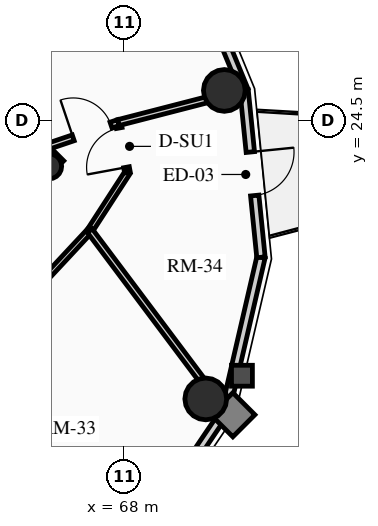
"""IFC4 building model, lengths in metres.
Left out: names, types, materials, properties, quantities, classifications, styles, units other than length and angle.
Written with IfcOpenShell. Run it as: python <this file> out.ifc"""

import sys

from ifc_helpers import new_model, si_unit, direction, frame, frame_2d, origin, origin_2d, place, context, subcontext, project, spatial, rectangle, circle, hollow_circle, extrude, source, transform, mapped, element, fill, save


model = new_model("IFC4")
c1 = context("Model", 3, precision=1e-05, world=origin(), true_north=direction((0.0, 1.0)))
c2 = subcontext(c1, "Body", "Model", "MODEL_VIEW")
j1 = project(units=[si_unit("LENGTHUNIT", "METRE"), si_unit("PLANEANGLEUNIT", "RADIAN")], contexts=[c1])
p1 = place(None, origin())
s1 = spatial("IfcSite", under=j1, at=p1, CompositionType="ELEMENT")
p2 = place(p1, origin())
s2 = spatial("IfcBuilding", under=s1, at=p2, CompositionType="ELEMENT")
p3 = place(p2, frame((0.0, 0.0, 214.12)))
s3 = spatial("IfcBuildingStorey", under=s2, at=p3, CompositionType="ELEMENT", Elevation=214.12)
p4 = place(p3, frame((66.268, 23.298, 0.0), z_axis=(0.0, 0.0, 1.0), x_axis=(-0.707106781187, 0.707106781187, 0.0)))
e1 = element("IfcWall", 1, at=p4, inside=s3, PredefinedType="SHEAR", context=c2, shape_type="SweptSolid", body=[
    extrude(rectangle(XDim=14.1, YDim=0.4, at=frame_2d((7.05, 0.0))), origin(), (0.0, 0.0, 1.0), 2.91),
])
p5 = place(p3, frame((58.561, 15.873, 0.0), z_axis=(0.0, 0.0, 1.0), x_axis=(0.707106781187, 0.707106781187, 0.0)))
e2 = element("IfcWall", 2, at=p5, inside=s3, PredefinedType="SHEAR", context=c2, shape_type="SweptSolid", body=[
    extrude(rectangle(XDim=10.7, YDim=0.4, at=frame_2d((5.35, 0.0))), origin(), (0.0, 0.0, 1.0), 2.91),
])
m1 = source(origin(), c2, "Body", "SweptSolid", [
    extrude(rectangle(XDim=1.5, YDim=2.02, at=frame_2d((0.75, 1.01))), frame((0.0, 0.21, 0.0), z_axis=(0.0, -1.0, 0.0), x_axis=(1.0, 0.0, 0.0)), (0.0, 0.0, 1.0), 0.42),
])
p6 = place(p5, frame((5.45, 0.0, 0.0)))
e3 = element("IfcOpeningElement", 3, at=p6, cuts=e2, PredefinedType="OPENING", context=c2, shape_type="MappedRepresentation", body=[
    mapped(m1, transform((0.0, 0.0, 0.0), x_axis=(1.0, 0.0, 0.0), y_axis=(0.0, 1.0, 0.0), z_axis=(0.0, 0.0, 1.0), scale=1.0)),
])
p7 = place(p3, frame((66.024, 23.294, 0.0), z_axis=(0.0, 0.0, 1.0), x_axis=(0.707106781187, 0.707106781187, 0.0)))
e4 = element("IfcColumn", 4, at=p7, inside=s3, PredefinedType="COLUMN", context=c2, shape_type="SweptSolid", body=[
    extrude(hollow_circle(Radius=0.33, WallThickness=0.025, at=origin_2d()), origin(), (0.0, 0.0, 1.0), 2.91),
])
for number, where, z_axis, x_axis in (
    (5, (70.146, 17.173, 0.0), (0.0, 0.0, 1.0), (1.0, 0.0, 0.0)),
    (6, (70.635, 25.291, 0.0), (0.0, 0.0, 1.0), (1.0, 0.0, 0.0)),
):
    element("IfcColumn", number, at=place(p3, frame(where, z_axis=z_axis, x_axis=x_axis)), inside=s3, PredefinedType="USERDEFINED", context=c2, shape_type="SweptSolid", body=[
        extrude(circle(Radius=0.55, at=origin_2d()), origin(), (0.0, 0.0, 1.0), 2.91),
    ])
p8 = place(p3, frame((70.663, 16.856, 0.0), z_axis=(0.0, 0.0, 1.0), x_axis=(-0.559495003079, -0.828833723692, 0.0)))
e7 = element("IfcWall", 7, at=p8, inside=s3, PredefinedType="SOLIDWALL", context=c2, shape_type="SweptSolid", body=[
    extrude(rectangle(XDim=3.976, YDim=0.22, at=frame_2d((1.988, 0.0))), origin(), (0.0, 0.0, 1.0), 2.322),
])
m2 = source(origin(), c2, "Body", "SweptSolid", [
    extrude(rectangle(XDim=1.05, YDim=1.3, at=frame_2d((0.525, 0.65))), frame((0.0, 0.12, 0.0), z_axis=(0.0, -1.0, 0.0), x_axis=(1.0, 0.0, 0.0)), (0.0, 0.0, 1.0), 0.24),
])
p9 = place(p8, frame((1.463, 0.0, 0.65)))
e8 = element("IfcOpeningElement", 8, at=p9, cuts=e7, PredefinedType="OPENING", context=c2, shape_type="MappedRepresentation", body=[
    mapped(m2, transform((0.0, 0.0, 0.0), x_axis=(1.0, 0.0, 0.0), y_axis=(0.0, 1.0, 0.0), z_axis=(0.0, 0.0, 1.0), scale=1.0)),
])
p10 = place(p3, frame((71.599, 20.9, 0.0), z_axis=(0.0, 0.0, 1.0), x_axis=(-0.225473813158, -0.974249228678, 0.0)))
e9 = element("IfcWall", 9, at=p10, inside=s3, PredefinedType="SOLIDWALL", context=c2, shape_type="SweptSolid", body=[
    extrude(rectangle(XDim=4.15, YDim=0.22, at=frame_2d((2.075, 0.0))), origin(), (0.0, 0.0, 1.0), 2.322),
])
p11 = place(p3, frame((71.155, 25.295, 0.0), z_axis=(0.0, 0.0, 1.0), x_axis=(0.100570534541, -0.994929930991, 0.0)))
e10 = element("IfcWall", 10, at=p11, inside=s3, PredefinedType="SOLIDWALL", context=c2, shape_type="SweptSolid", body=[
    extrude(rectangle(XDim=4.418, YDim=0.22, at=frame_2d((2.209, 0.0))), origin(), (0.0, 0.0, 1.0), 2.322),
])
m3 = source(origin(), c2, "Body", "SweptSolid", [
    extrude(rectangle(XDim=1.15, YDim=2.005, at=frame_2d((0.575, 1.002))), frame((0.0, 0.12, 0.0), z_axis=(0.0, -1.0, 0.0), x_axis=(1.0, 0.0, 0.0)), (0.0, 0.0, 1.0), 0.24),
])
p12 = place(p11, frame((1.634, 0.0, 0.0)))
e11 = element("IfcOpeningElement", 11, at=p12, cuts=e10, PredefinedType="OPENING", context=c2, shape_type="MappedRepresentation", body=[
    mapped(m3, transform((0.0, 0.0, 0.0), x_axis=(1.0, 0.0, 0.0), y_axis=(0.0, 1.0, 0.0), z_axis=(0.0, 0.0, 1.0), scale=1.0)),
])
p13 = place(p3, frame((69.374, 29.613, 0.0), z_axis=(0.0, 0.0, 1.0), x_axis=(0.381309704956, -0.924447353237, 0.0)))
e12 = element("IfcWall", 12, at=p13, inside=s3, PredefinedType="SOLIDWALL", context=c2, shape_type="SweptSolid", body=[
    extrude(rectangle(XDim=4.671, YDim=0.22, at=frame_2d((2.335, 0.0))), origin(), (0.0, 0.0, 1.0), 2.322),
])
p14 = place(p3, frame((62.736, 16.924, 0.0), z_axis=(0.0, 0.0, 1.0), x_axis=(0.681946700833, 0.731401871219, 0.0)))
e13 = element("IfcWall", 13, at=p14, inside=s3, PredefinedType="PARTITIONING", context=c2, shape_type="SweptSolid", body=[
    extrude(rectangle(XDim=6.393, YDim=0.15, at=frame_2d((3.196, 0.0))), origin(), (0.0, 0.0, 1.0), 2.255),
])
p15 = place(p3, frame((67.095, 21.6, 0.0), z_axis=(0.0, 0.0, 1.0), x_axis=(0.543773190184, 0.839232219137, 0.0)))
e14 = element("IfcWall", 14, at=p15, inside=s3, PredefinedType="PARTITIONING", context=c2, shape_type="SweptSolid", body=[
    extrude(rectangle(XDim=1.823, YDim=0.15, at=frame_2d((0.911, 0.0))), origin(), (0.0, 0.0, 1.0), 2.255),
])
p16 = place(p3, frame((68.086, 23.129, 0.0), z_axis=(0.0, 0.0, 1.0), x_axis=(-0.182004193146, 0.983297754334, 0.0)))
e15 = element("IfcWall", 15, at=p16, inside=s3, PredefinedType="PARTITIONING", context=c2, shape_type="SweptSolid", body=[
    extrude(rectangle(XDim=1.336, YDim=0.15, at=frame_2d((0.668, 0.0))), origin(), (0.0, 0.0, 1.0), 2.322),
])
m4 = source(origin(), c2, "Body", "SweptSolid", [
    extrude(rectangle(XDim=1.05, YDim=2.015, at=frame_2d((0.525, 1.007))), frame((0.0, 0.085, 0.0), z_axis=(0.0, -1.0, 0.0), x_axis=(1.0, 0.0, 0.0)), (0.0, 0.0, 1.0), 0.17),
])
p17 = place(p16, frame((0.143, 0.0, 0.0)))
e16 = element("IfcOpeningElement", 16, at=p17, cuts=e15, PredefinedType="OPENING", context=c2, shape_type="MappedRepresentation", body=[
    mapped(m4, transform((0.0, 0.0, 0.0), x_axis=(1.0, 0.0, 0.0), y_axis=(0.0, 1.0, 0.0), z_axis=(0.0, 0.0, 1.0), scale=1.0)),
])
p18 = place(p3, frame((67.095, 21.6, 0.0), z_axis=(0.0, 0.0, 1.0), x_axis=(0.599947190798, -0.800039604178, 0.0)))
e17 = element("IfcWall", 17, at=p18, inside=s3, PredefinedType="PARTITIONING", context=c2, shape_type="SweptSolid", body=[
    extrude(rectangle(XDim=5.918, YDim=0.16, at=frame_2d((2.959, 0.0))), origin(), (0.0, 0.0, 1.0), 2.322),
])
p19 = place(p3, frame((67.843, 24.443, 0.0), z_axis=(0.0, 0.0, 1.0), x_axis=(0.968303102463, 0.249778105048, 0.0)))
e18 = element("IfcWall", 18, at=p19, inside=s3, PredefinedType="PARTITIONING", context=c2, shape_type="SweptSolid", body=[
    extrude(rectangle(XDim=3.399, YDim=0.16, at=frame_2d((1.7, 0.0))), origin(), (0.0, 0.0, 1.0), 2.322),
])
p20 = place(p3, frame((66.021, 23.828, 0.0), z_axis=(0.0, 0.0, 1.0), x_axis=(0.947522075691, 0.319690344049, 0.0)))
e19 = element("IfcWall", 19, at=p20, inside=s3, PredefinedType="PARTITIONING", context=c2, shape_type="SweptSolid", body=[
    extrude(rectangle(XDim=1.924, YDim=0.16, at=frame_2d((0.962, 0.0))), origin(), (0.0, 0.0, 1.0), 2.255),
])
m5 = source(origin(), c2, "Body", "SweptSolid", [
    extrude(rectangle(XDim=1.05, YDim=2.015, at=frame_2d((0.525, 1.007))), frame((0.0, 0.09, 0.0), z_axis=(0.0, -1.0, 0.0), x_axis=(1.0, 0.0, 0.0)), (0.0, 0.0, 1.0), 0.18),
])
p21 = place(p20, frame((0.674, 0.0, 0.0)))
e20 = element("IfcOpeningElement", 20, at=p21, cuts=e19, PredefinedType="OPENING", context=c2, shape_type="MappedRepresentation", body=[
    mapped(m5, transform((0.0, 0.0, 0.0), x_axis=(1.0, 0.0, 0.0), y_axis=(0.0, 1.0, 0.0), z_axis=(0.0, 0.0, 1.0), scale=1.0)),
])
m6 = source(origin(), c2, "Body", "SweptSolid", [
    extrude(rectangle(XDim=1.15, YDim=2.005, at=frame_2d((0.575, 1.002))), frame((0.0, 0.025, 0.0), z_axis=(0.0, -1.0, 0.0), x_axis=(1.0, 0.0, 0.0)), (0.0, 0.0, 1.0), 0.05),
])
p22 = place(p12, origin())
e21 = element("IfcDoor", 21, at=p22, inside=s3, OperationType="SINGLE_SWING_LEFT", PredefinedType="DOOR", context=c2, shape_type="MappedRepresentation", body=[
    mapped(m6, transform((0.0, 0.0, 0.0), x_axis=(1.0, 0.0, 0.0), y_axis=(0.0, 1.0, 0.0), z_axis=(0.0, 0.0, 1.0), scale=1.0)),
])
fill(e11, e21)
m7 = source(origin(), c2, "Body", "SweptSolid", [
    extrude(rectangle(XDim=1.05, YDim=2.015, at=frame_2d((0.525, 1.007))), frame((0.0, 0.025, 0.0), z_axis=(0.0, -1.0, 0.0), x_axis=(1.0, 0.0, 0.0)), (0.0, 0.0, 1.0), 0.05),
])
p23 = place(p21, origin())
e22 = element("IfcDoor", 22, at=p23, inside=s3, OperationType="SINGLE_SWING_LEFT", PredefinedType="DOOR", context=c2, shape_type="MappedRepresentation", body=[
    mapped(m7, transform((0.0, 0.0, 0.0), x_axis=(1.0, 0.0, 0.0), y_axis=(0.0, 1.0, 0.0), z_axis=(0.0, 0.0, 1.0), scale=1.0)),
])
fill(e20, e22)
p24 = place(p17, origin())
e23 = element("IfcDoor", 23, at=p24, inside=s3, OperationType="SINGLE_SWING_LEFT", PredefinedType="DOOR", context=c2, shape_type="MappedRepresentation", body=[
    mapped(m7, transform((0.0, 0.0, 0.0), x_axis=(1.0, 0.0, 0.0), y_axis=(0.0, 1.0, 0.0), z_axis=(0.0, 0.0, 1.0), scale=1.0)),
])
fill(e16, e23)
save(model, sys.argv[1])
